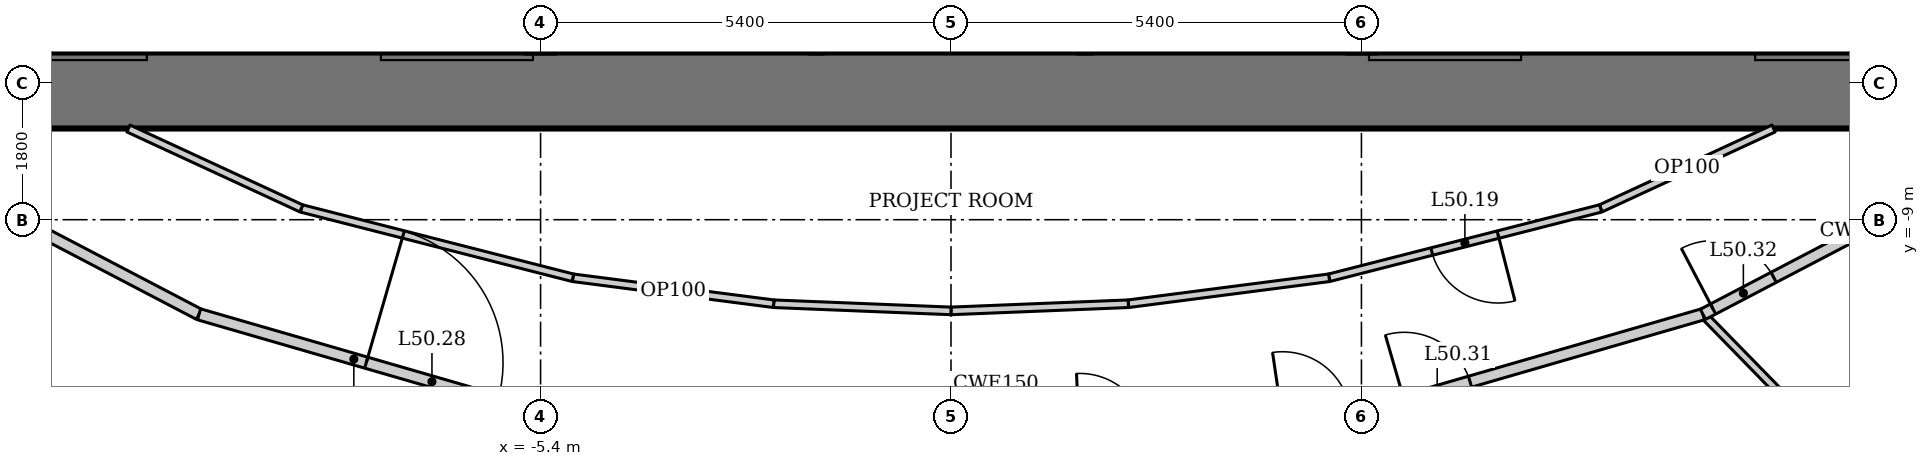
"""IFC4 building model, lengths in metres.
Left out: names, types, materials, properties, quantities, classifications, styles, units other than length and angle.
Written with IfcOpenShell. Run it as: python <this file> out.ifc"""

import sys

from ifc_helpers import new_model, si_unit, direction, frame, frame_2d, origin, place, context, subcontext, project, spatial, rectangle, extrude, element, fill, save


model = new_model("IFC4")
c1 = context("Model", 3, precision=1e-05, world=origin(), true_north=direction((0.0, 1.0)))
c2 = subcontext(c1, "Body", "Model", "MODEL_VIEW")
j1 = project(units=[si_unit("LENGTHUNIT", "METRE"), si_unit("PLANEANGLEUNIT", "RADIAN")], contexts=[c1])
p1 = place(None, origin())
s1 = spatial("IfcSite", under=j1, at=p1, CompositionType="ELEMENT")
p2 = place(p1, origin())
s2 = spatial("IfcBuilding", under=s1, at=p2, CompositionType="ELEMENT")
p3 = place(p2, frame((0.0, 0.0, 215.8)))
s3 = spatial("IfcBuildingStorey", under=s2, at=p3, CompositionType="ELEMENT", Elevation=215.8)
p4 = place(p3, frame((-12.2, -7.3, 0.0), z_axis=(0.0, 0.0, 1.0), x_axis=(1.0, 0.0, 0.0)))
e1 = element("IfcWall", 1, at=p4, inside=s3, PredefinedType="SHEAR", context=c2, shape_type="SweptSolid", body=[
    extrude(rectangle(XDim=24.4, YDim=1.0, at=frame_2d((12.2, 0.0))), origin(), (0.0, 0.0, 1.0), 4.2),
])
for number, where, z_axis, x_axis in (
    (2, (-1.767, -2.6, 0.0), (0.0, 0.0, 1.0), (0.0, -1.0, 0.0)),
    (3, (1.767, -2.6, 0.0), (0.0, 0.0, 1.0), (0.0, -1.0, 0.0)),
):
    element("IfcWall", number, at=place(p3, frame(where, z_axis=z_axis, x_axis=x_axis)), inside=s3, PredefinedType="SOLIDWALL", context=c2, shape_type="SweptSolid", body=[
        extrude(rectangle(XDim=4.2, YDim=0.2, at=frame_2d((2.1, 0.0))), origin(), (0.0, 0.0, 1.0), 4.2),
    ])
p5 = place(p3, frame((15.709, -16.199, 0.0), z_axis=(0.0, 0.0, 1.0), x_axis=(-0.69875697861, 0.715359129978, 0.0)))
e4 = element("IfcWall", 4, at=p5, inside=s3, PredefinedType="PARTITIONING", context=c2, shape_type="SweptSolid", body=[
    extrude(rectangle(XDim=8.323, YDim=0.1, at=frame_2d((4.162, 0.0))), origin(), (0.0, 0.0, 1.0), 3.41),
])
p6 = place(p3, frame((-14.089, -8.051, 0.0), z_axis=(0.0, 0.0, 1.0), x_axis=(0.886174439647, -0.463351769735, 0.0)))
e5 = element("IfcWall", 5, at=p6, inside=s3, PredefinedType="PARTITIONING", context=c2, shape_type="SweptSolid", body=[
    extrude(rectangle(XDim=4.735, YDim=0.15, at=frame_2d((2.367, 0.0))), origin(), (0.0, 0.0, 1.0), 4.05),
])
p7 = place(p3, frame((-9.893, -10.245, 0.0), z_axis=(0.0, 0.0, 1.0), x_axis=(0.960614838378, -0.27788330696, 0.0)))
e6 = element("IfcWall", 6, at=p7, inside=s3, PredefinedType="PARTITIONING", context=c2, shape_type="SweptSolid", body=[
    extrude(rectangle(XDim=4.24, YDim=0.15, at=frame_2d((2.12, 0.0))), origin(), (0.0, 0.0, 1.0), 4.05),
])
p8 = place(p7, frame((2.29, 0.0, 0.0)))
e7 = element("IfcOpeningElement", 7, at=p8, cuts=e6, PredefinedType="OPENING", context=c2, shape_type="SweptSolid", body=[
    extrude(rectangle(XDim=1.8, YDim=2.1, at=frame_2d((0.9, 1.05))), frame((0.0, 0.085, 0.0), z_axis=(0.0, -1.0, 0.0), x_axis=(1.0, 0.0, 0.0)), (0.0, 0.0, 1.0), 0.17),
])
p9 = place(p3, frame((5.82, -11.423, 0.0), z_axis=(0.0, 0.0, 1.0), x_axis=(0.960614838378, 0.27788330696, 0.0)))
e8 = element("IfcWall", 8, at=p9, inside=s3, PredefinedType="PARTITIONING", context=c2, shape_type="SweptSolid", body=[
    extrude(rectangle(XDim=4.24, YDim=0.15, at=frame_2d((2.12, 0.0))), origin(), (0.0, 0.0, 1.0), 4.05),
])
p10 = place(p9, frame((0.15, 0.0, 0.0)))
e9 = element("IfcOpeningElement", 9, at=p10, cuts=e8, PredefinedType="OPENING", context=c2, shape_type="SweptSolid", body=[
    extrude(rectangle(XDim=0.9, YDim=2.1, at=frame_2d((0.45, 1.05))), frame((0.0, 0.085, 0.0), z_axis=(0.0, -1.0, 0.0), x_axis=(1.0, 0.0, 0.0)), (0.0, 0.0, 1.0), 0.17),
])
p11 = place(p3, frame((9.893, -10.245, 0.0), z_axis=(0.0, 0.0, 1.0), x_axis=(0.886174439647, 0.463351769735, 0.0)))
e10 = element("IfcWall", 10, at=p11, inside=s3, PredefinedType="PARTITIONING", context=c2, shape_type="SweptSolid", body=[
    extrude(rectangle(XDim=4.735, YDim=0.15, at=frame_2d((2.367, 0.0))), origin(), (0.0, 0.0, 1.0), 4.05),
])
p12 = place(p11, frame((0.15, 0.0, 0.0)))
e11 = element("IfcOpeningElement", 11, at=p12, cuts=e10, PredefinedType="OPENING", context=c2, shape_type="SweptSolid", body=[
    extrude(rectangle(XDim=0.9, YDim=2.1, at=frame_2d((0.45, 1.05))), frame((0.0, 0.085, 0.0), z_axis=(0.0, -1.0, 0.0), x_axis=(1.0, 0.0, 0.0)), (0.0, 0.0, 1.0), 0.17),
])
p13 = place(p3, frame((10.823, -7.8, 0.0), z_axis=(0.0, 0.0, 1.0), x_axis=(-0.907759689292, -0.419490579748, 0.0)))
e12 = element("IfcWall", 12, at=p13, inside=s3, PredefinedType="PARTITIONING", context=c2, shape_type="SweptSolid", body=[
    extrude(rectangle(XDim=2.506, YDim=0.1, at=frame_2d((1.253, 0.0))), origin(), (0.0, 0.0, 1.0), 4.05),
])
p14 = place(p3, frame((8.548, -8.851, 0.0), z_axis=(0.0, 0.0, 1.0), x_axis=(-0.968887312542, -0.247502273921, 0.0)))
e13 = element("IfcWall", 13, at=p14, inside=s3, PredefinedType="PARTITIONING", context=c2, shape_type="SweptSolid", body=[
    extrude(rectangle(XDim=3.687, YDim=0.1, at=frame_2d((1.844, 0.0))), origin(), (0.0, 0.0, 1.0), 4.05),
])
p15 = place(p14, frame((1.394, 0.0, 0.0)))
e14 = element("IfcOpeningElement", 14, at=p15, cuts=e13, PredefinedType="OPENING", context=c2, shape_type="SweptSolid", body=[
    extrude(rectangle(XDim=0.9, YDim=2.1, at=frame_2d((0.45, 1.05))), frame((0.0, 0.06, 0.0), z_axis=(0.0, -1.0, 0.0), x_axis=(1.0, 0.0, 0.0)), (0.0, 0.0, 1.0), 0.12),
])
p16 = place(p3, frame((4.975, -9.764, 0.0), z_axis=(0.0, 0.0, 1.0), x_axis=(-0.99173579163, -0.128296997624, 0.0)))
e15 = element("IfcWall", 15, at=p16, inside=s3, PredefinedType="PARTITIONING", context=c2, shape_type="SweptSolid", body=[
    extrude(rectangle(XDim=2.664, YDim=0.1, at=frame_2d((1.332, 0.0))), origin(), (0.0, 0.0, 1.0), 4.05),
])
for number, where, z_axis, x_axis in (
    (16, (2.333, -10.106, 0.0), (0.0, 0.0, 1.0), (-0.999, -0.04, 0.0)),
    (17, (0.0, -10.2, 0.0), (0.0, 0.0, 1.0), (-0.999, 0.04, 0.0)),
):
    element("IfcWall", number, at=place(p3, frame(where, z_axis=z_axis, x_axis=x_axis)), inside=s3, PredefinedType="PARTITIONING", context=c2, shape_type="SweptSolid", body=[
        extrude(rectangle(XDim=2.335, YDim=0.1, at=frame_2d((1.167, 0.0))), origin(), (0.0, 0.0, 1.0), 4.05),
    ])
p17 = place(p3, frame((-2.333, -10.106, 0.0), z_axis=(0.0, 0.0, 1.0), x_axis=(-0.99173579163, 0.128296997624, 0.0)))
e18 = element("IfcWall", 18, at=p17, inside=s3, PredefinedType="PARTITIONING", context=c2, shape_type="SweptSolid", body=[
    extrude(rectangle(XDim=2.664, YDim=0.1, at=frame_2d((1.332, 0.0))), origin(), (0.0, 0.0, 1.0), 4.05),
])
p18 = place(p3, frame((-4.975, -9.764, 0.0), z_axis=(0.0, 0.0, 1.0), x_axis=(-0.968887312542, 0.247502273921, 0.0)))
e19 = element("IfcWall", 19, at=p18, inside=s3, PredefinedType="PARTITIONING", context=c2, shape_type="SweptSolid", body=[
    extrude(rectangle(XDim=3.687, YDim=0.1, at=frame_2d((1.844, 0.0))), origin(), (0.0, 0.0, 1.0), 4.05),
])
p19 = place(p3, frame((-8.548, -8.851, 0.0), z_axis=(0.0, 0.0, 1.0), x_axis=(-0.907759689292, 0.419490579748, 0.0)))
e20 = element("IfcWall", 20, at=p19, inside=s3, PredefinedType="PARTITIONING", context=c2, shape_type="SweptSolid", body=[
    extrude(rectangle(XDim=2.506, YDim=0.1, at=frame_2d((1.253, 0.0))), origin(), (0.0, 0.0, 1.0), 4.05),
])
p20 = place(p15, origin())
e21 = element("IfcDoor", 21, at=p20, inside=s3, OperationType="SINGLE_SWING_LEFT", PredefinedType="DOOR", context=c2, shape_type="SweptSolid", body=[
    extrude(rectangle(XDim=0.9, YDim=2.1, at=frame_2d((0.45, 1.05))), frame((0.0, 0.025, 0.0), z_axis=(0.0, -1.0, 0.0), x_axis=(1.0, 0.0, 0.0)), (0.0, 0.0, 1.0), 0.05),
])
fill(e14, e21)
p21 = place(p8, origin())
e22 = element("IfcDoor", 22, at=p21, inside=s3, OperationType="DOUBLE_DOOR_DOUBLE_SWING", PredefinedType="DOOR", context=c2, shape_type="SweptSolid", body=[
    extrude(rectangle(XDim=1.8, YDim=2.1, at=frame_2d((0.9, 1.05))), frame((0.0, 0.025, 0.0), z_axis=(0.0, -1.0, 0.0), x_axis=(1.0, 0.0, 0.0)), (0.0, 0.0, 1.0), 0.05),
])
fill(e7, e22)
p22 = place(p10, origin())
e23 = element("IfcDoor", 23, at=p22, inside=s3, OperationType="SINGLE_SWING_LEFT", PredefinedType="DOOR", context=c2, shape_type="SweptSolid", body=[
    extrude(rectangle(XDim=0.9, YDim=2.1, at=frame_2d((0.45, 1.05))), frame((0.0, 0.025, 0.0), z_axis=(0.0, -1.0, 0.0), x_axis=(1.0, 0.0, 0.0)), (0.0, 0.0, 1.0), 0.05),
])
fill(e9, e23)
p23 = place(p12, origin())
e24 = element("IfcDoor", 24, at=p23, inside=s3, OperationType="SINGLE_SWING_LEFT", PredefinedType="DOOR", context=c2, shape_type="SweptSolid", body=[
    extrude(rectangle(XDim=0.9, YDim=2.1, at=frame_2d((0.45, 1.05))), frame((0.0, 0.025, 0.0), z_axis=(0.0, -1.0, 0.0), x_axis=(1.0, 0.0, 0.0)), (0.0, 0.0, 1.0), 0.05),
])
fill(e11, e24)
save(model, sys.argv[1])
